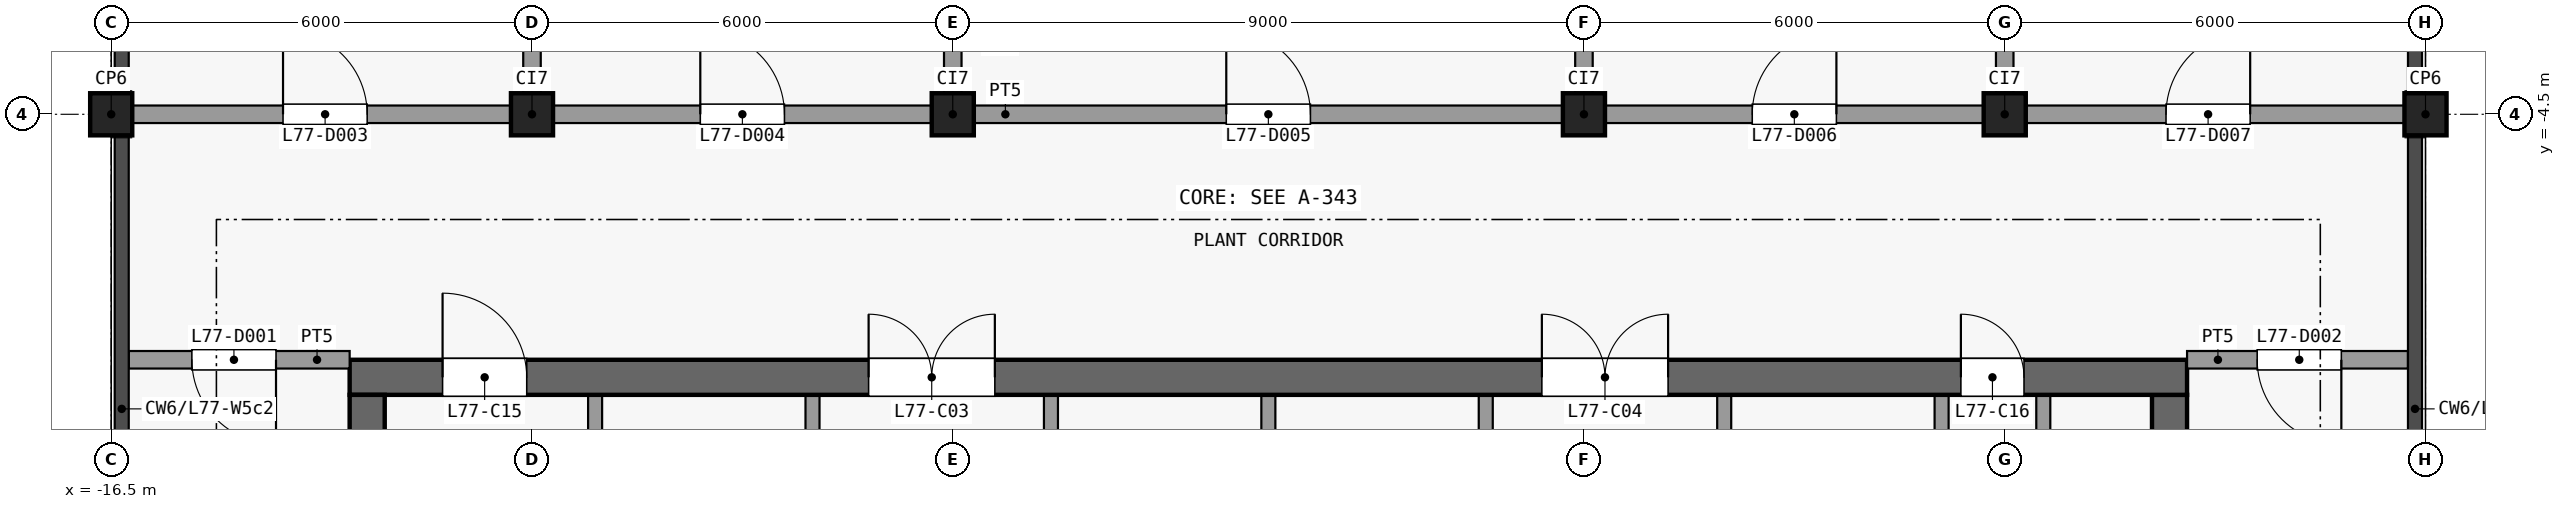
"""IFC4 building model, lengths in metres.
Left out: names, types, materials, properties, quantities, classifications, styles, units other than length and angle.
Written with IfcOpenShell. Run it as: python <this file> out.ifc"""

import sys

from ifc_helpers import new_model, si_unit, direction, frame, frame_2d, origin, origin_2d, place, context, subcontext, project, spatial, rectangle, extrude, element, fill, save


model = new_model("IFC4")
c1 = context("Model", 3, precision=1e-05, world=origin(), true_north=direction((0.0, 1.0)))
c2 = subcontext(c1, "Body", "Model", "MODEL_VIEW")
j1 = project(units=[si_unit("LENGTHUNIT", "METRE"), si_unit("PLANEANGLEUNIT", "RADIAN")], contexts=[c1])
p1 = place(None, origin())
s1 = spatial("IfcSite", under=j1, at=p1, CompositionType="ELEMENT")
p2 = place(p1, origin())
s2 = spatial("IfcBuilding", under=s1, at=p2, CompositionType="ELEMENT")
p3 = place(p2, frame((0.0, 0.0, 303.2)))
s3 = spatial("IfcBuildingStorey", under=s2, at=p3, CompositionType="ELEMENT", Elevation=303.2)
for number, where, z_axis, x_axis in (
    (1, (-16.5, -4.5, 0.0), (0.0, 0.0, 1.0), (1.0, 0.0, 0.0)),
    (2, (-10.5, -4.5, 0.0), (0.0, 0.0, 1.0), (1.0, 0.0, 0.0)),
    (3, (-4.5, -4.5, 0.0), (0.0, 0.0, 1.0), (1.0, 0.0, 0.0)),
    (4, (4.5, -4.5, 0.0), (0.0, 0.0, 1.0), (1.0, 0.0, 0.0)),
    (5, (10.5, -4.5, 0.0), (0.0, 0.0, 1.0), (1.0, 0.0, 0.0)),
    (6, (16.5, -4.5, 0.0), (0.0, 0.0, 1.0), (1.0, 0.0, 0.0)),
):
    element("IfcColumn", number, at=place(p3, frame(where, z_axis=z_axis, x_axis=x_axis)), inside=s3, PredefinedType="COLUMN", context=c2, shape_type="SweptSolid", body=[
        extrude(rectangle(XDim=0.6, YDim=0.6, at=origin_2d()), origin(), (0.0, 0.0, 1.0), 4.5),
    ])
p4 = place(p3, frame((-13.1, -8.25, 0.0), z_axis=(0.0, 0.0, 1.0), x_axis=(1.0, 0.0, 0.0)))
e7 = element("IfcWall", 7, at=p4, inside=s3, PredefinedType="SHEAR", context=c2, shape_type="SweptSolid", body=[
    extrude(rectangle(XDim=26.2, YDim=0.5, at=frame_2d((13.1, 0.0))), origin(), (0.0, 0.0, 1.0), 4.2),
])
p5 = place(p4, frame((7.4, 0.0, 0.0)))
e8 = element("IfcOpeningElement", 8, at=p5, cuts=e7, PredefinedType="OPENING", context=c2, shape_type="SweptSolid", body=[
    extrude(rectangle(XDim=1.8, YDim=2.1, at=frame_2d((0.9, 1.05))), frame((0.0, 0.26, 0.0), z_axis=(0.0, -1.0, 0.0), x_axis=(1.0, 0.0, 0.0)), (0.0, 0.0, 1.0), 0.52),
])
p6 = place(p4, frame((17.0, 0.0, 0.0)))
e9 = element("IfcOpeningElement", 9, at=p6, cuts=e7, PredefinedType="OPENING", context=c2, shape_type="SweptSolid", body=[
    extrude(rectangle(XDim=1.8, YDim=2.1, at=frame_2d((0.9, 1.05))), frame((0.0, 0.26, 0.0), z_axis=(0.0, -1.0, 0.0), x_axis=(1.0, 0.0, 0.0)), (0.0, 0.0, 1.0), 0.52),
])
p7 = place(p4, frame((1.325, 0.0, 0.0)))
e10 = element("IfcOpeningElement", 10, at=p7, cuts=e7, PredefinedType="OPENING", context=c2, shape_type="SweptSolid", body=[
    extrude(rectangle(XDim=1.2, YDim=2.1, at=frame_2d((0.6, 1.05))), frame((0.0, 0.26, 0.0), z_axis=(0.0, -1.0, 0.0), x_axis=(1.0, 0.0, 0.0)), (0.0, 0.0, 1.0), 0.52),
])
p8 = place(p4, frame((22.975, 0.0, 0.0)))
e11 = element("IfcOpeningElement", 11, at=p8, cuts=e7, PredefinedType="OPENING", context=c2, shape_type="SweptSolid", body=[
    extrude(rectangle(XDim=0.9, YDim=2.1, at=frame_2d((0.45, 1.05))), frame((0.0, 0.26, 0.0), z_axis=(0.0, -1.0, 0.0), x_axis=(1.0, 0.0, 0.0)), (0.0, 0.0, 1.0), 0.52),
])
for number, where, z_axis, x_axis in (
    (12, (-12.85, -24.6, 0.0), (0.0, 0.0, 1.0), (0.0, 1.0, 0.0)),
    (13, (12.85, -24.6, 0.0), (0.0, 0.0, 1.0), (0.0, 1.0, 0.0)),
):
    element("IfcWall", number, at=place(p3, frame(where, z_axis=z_axis, x_axis=x_axis)), inside=s3, PredefinedType="SHEAR", context=c2, shape_type="SweptSolid", body=[
        extrude(rectangle(XDim=16.1, YDim=0.5, at=frame_2d((8.05, 0.0))), origin(), (0.0, 0.0, 1.0), 4.2),
    ])
p9 = place(p3, frame((-9.6, -16.9, 0.0), z_axis=(0.0, 0.0, 1.0), x_axis=(0.0, 1.0, 0.0)))
e14 = element("IfcWall", 14, at=p9, inside=s3, PredefinedType="PARTITIONING", context=c2, shape_type="SweptSolid", body=[
    extrude(rectangle(XDim=8.4, YDim=0.2, at=frame_2d((4.2, 0.0))), origin(), (0.0, 0.0, 1.0), 4.2),
])
p10 = place(p3, frame((-6.5, -22.5, 0.0), z_axis=(0.0, 0.0, 1.0), x_axis=(0.0, 1.0, 0.0)))
e15 = element("IfcWall", 15, at=p10, inside=s3, PredefinedType="PARTITIONING", context=c2, shape_type="SweptSolid", body=[
    extrude(rectangle(XDim=14.0, YDim=0.2, at=frame_2d((7.0, 0.0))), origin(), (0.0, 0.0, 1.0), 4.2),
])
p11 = place(p10, frame((2.28, 0.0, 0.0)))
e16 = element("IfcOpeningElement", 16, at=p11, cuts=e15, PredefinedType="OPENING", context=c2, shape_type="SweptSolid", body=[
    extrude(rectangle(XDim=1.2, YDim=2.1, at=frame_2d((0.6, 1.05))), frame((0.0, 0.11, 0.0), z_axis=(0.0, -1.0, 0.0), x_axis=(1.0, 0.0, 0.0)), (0.0, 0.0, 1.0), 0.22),
])
p12 = place(p10, frame((9.23, 0.0, 0.0)))
e17 = element("IfcOpeningElement", 17, at=p12, cuts=e15, PredefinedType="OPENING", context=c2, shape_type="SweptSolid", body=[
    extrude(rectangle(XDim=1.2, YDim=2.1, at=frame_2d((0.6, 1.05))), frame((0.0, 0.11, 0.0), z_axis=(0.0, -1.0, 0.0), x_axis=(1.0, 0.0, 0.0)), (0.0, 0.0, 1.0), 0.22),
])
p13 = place(p3, frame((-3.1, -8.5, 0.0), z_axis=(0.0, 0.0, 1.0), x_axis=(0.0, -1.0, 0.0)))
e18 = element("IfcWall", 18, at=p13, inside=s3, PredefinedType="PARTITIONING", context=c2, shape_type="SweptSolid", body=[
    extrude(rectangle(XDim=10.97, YDim=0.2, at=frame_2d((5.485, 0.0))), origin(), (0.0, 0.0, 1.0), 4.2),
])
p14 = place(p13, frame((7.74, 0.0, 0.0)))
e19 = element("IfcOpeningElement", 19, at=p14, cuts=e18, PredefinedType="OPENING", context=c2, shape_type="SweptSolid", body=[
    extrude(rectangle(XDim=1.2, YDim=2.1, at=frame_2d((0.6, 1.05))), frame((0.0, 0.11, 0.0), z_axis=(0.0, -1.0, 0.0), x_axis=(1.0, 0.0, 0.0)), (0.0, 0.0, 1.0), 0.22),
])
p15 = place(p13, frame((2.18, 0.0, 0.0)))
e20 = element("IfcOpeningElement", 20, at=p15, cuts=e18, PredefinedType="OPENING", context=c2, shape_type="SweptSolid", body=[
    extrude(rectangle(XDim=1.2, YDim=2.1, at=frame_2d((0.6, 1.05))), frame((0.0, 0.11, 0.0), z_axis=(0.0, -1.0, 0.0), x_axis=(1.0, 0.0, 0.0)), (0.0, 0.0, 1.0), 0.22),
])
p16 = place(p3, frame((0.0, -19.35, 0.0), z_axis=(0.0, 0.0, 1.0), x_axis=(0.0, 1.0, 0.0)))
e21 = element("IfcWall", 21, at=p16, inside=s3, PredefinedType="PARTITIONING", context=c2, shape_type="SweptSolid", body=[
    extrude(rectangle(XDim=10.85, YDim=0.2, at=frame_2d((5.425, 0.0))), origin(), (0.0, 0.0, 1.0), 4.2),
])
p17 = place(p3, frame((3.1, -19.6, 0.0), z_axis=(0.0, 0.0, 1.0), x_axis=(0.0, 1.0, 0.0)))
e22 = element("IfcWall", 22, at=p17, inside=s3, PredefinedType="PARTITIONING", context=c2, shape_type="SweptSolid", body=[
    extrude(rectangle(XDim=11.1, YDim=0.2, at=frame_2d((5.55, 0.0))), origin(), (0.0, 0.0, 1.0), 4.2),
])
p18 = place(p17, frame((2.25, 0.0, 0.0)))
e23 = element("IfcOpeningElement", 23, at=p18, cuts=e22, PredefinedType="OPENING", context=c2, shape_type="SweptSolid", body=[
    extrude(rectangle(XDim=1.2, YDim=2.1, at=frame_2d((0.6, 1.05))), frame((0.0, 0.11, 0.0), z_axis=(0.0, -1.0, 0.0), x_axis=(1.0, 0.0, 0.0)), (0.0, 0.0, 1.0), 0.22),
])
p19 = place(p17, frame((7.75, 0.0, 0.0)))
e24 = element("IfcOpeningElement", 24, at=p19, cuts=e22, PredefinedType="OPENING", context=c2, shape_type="SweptSolid", body=[
    extrude(rectangle(XDim=1.2, YDim=2.1, at=frame_2d((0.6, 1.05))), frame((0.0, 0.11, 0.0), z_axis=(0.0, -1.0, 0.0), x_axis=(1.0, 0.0, 0.0)), (0.0, 0.0, 1.0), 0.22),
])
p20 = place(p3, frame((6.5, -8.5, 0.0), z_axis=(0.0, 0.0, 1.0), x_axis=(0.0, -1.0, 0.0)))
e25 = element("IfcWall", 25, at=p20, inside=s3, PredefinedType="PARTITIONING", context=c2, shape_type="SweptSolid", body=[
    extrude(rectangle(XDim=10.85, YDim=0.2, at=frame_2d((5.425, 0.0))), origin(), (0.0, 0.0, 1.0), 4.2),
])
p21 = place(p20, frame((6.275, 0.0, 0.0)))
e26 = element("IfcOpeningElement", 26, at=p21, cuts=e25, PredefinedType="OPENING", context=c2, shape_type="SweptSolid", body=[
    extrude(rectangle(XDim=1.2, YDim=2.1, at=frame_2d((0.6, 1.05))), frame((0.0, 0.11, 0.0), z_axis=(0.0, -1.0, 0.0), x_axis=(1.0, 0.0, 0.0)), (0.0, 0.0, 1.0), 0.22),
])
p22 = place(p20, frame((0.925, 0.0, 0.0)))
e27 = element("IfcOpeningElement", 27, at=p22, cuts=e25, PredefinedType="OPENING", context=c2, shape_type="SweptSolid", body=[
    extrude(rectangle(XDim=0.9, YDim=2.1, at=frame_2d((0.45, 1.05))), frame((0.0, 0.11, 0.0), z_axis=(0.0, -1.0, 0.0), x_axis=(1.0, 0.0, 0.0)), (0.0, 0.0, 1.0), 0.22),
])
p23 = place(p3, frame((9.6, -16.9, 0.0), z_axis=(0.0, 0.0, 1.0), x_axis=(0.0, 1.0, 0.0)))
e28 = element("IfcWall", 28, at=p23, inside=s3, PredefinedType="PARTITIONING", context=c2, shape_type="SweptSolid", body=[
    extrude(rectangle(XDim=8.4, YDim=0.2, at=frame_2d((4.2, 0.0))), origin(), (0.0, 0.0, 1.0), 4.2),
])
p24 = place(p3, frame((11.05, -8.5, 0.0), z_axis=(0.0, 0.0, 1.0), x_axis=(0.0, -1.0, 0.0)))
e29 = element("IfcWall", 29, at=p24, inside=s3, PredefinedType="PARTITIONING", context=c2, shape_type="SweptSolid", body=[
    extrude(rectangle(XDim=6.2, YDim=0.2, at=frame_2d((3.1, 0.0))), origin(), (0.0, 0.0, 1.0), 4.2),
])
p25 = place(p24, frame((2.6, 0.0, 0.0)))
e30 = element("IfcOpeningElement", 30, at=p25, cuts=e29, PredefinedType="OPENING", context=c2, shape_type="SweptSolid", body=[
    extrude(rectangle(XDim=0.9, YDim=2.1, at=frame_2d((0.45, 1.05))), frame((0.0, 0.11, 0.0), z_axis=(0.0, -1.0, 0.0), x_axis=(1.0, 0.0, 0.0)), (0.0, 0.0, 1.0), 0.22),
])
p26 = place(p3, frame((-16.25, -8.0, 0.0), z_axis=(0.0, 0.0, 1.0), x_axis=(1.0, 0.0, 0.0)))
e31 = element("IfcWall", 31, at=p26, inside=s3, PredefinedType="PARTITIONING", context=c2, shape_type="SweptSolid", body=[
    extrude(rectangle(XDim=3.15, YDim=0.25, at=frame_2d((1.575, 0.0))), origin(), (0.0, 0.0, 1.0), 4.2),
])
p27 = place(p26, frame((0.9, 0.0, 0.0)))
e32 = element("IfcOpeningElement", 32, at=p27, cuts=e31, PredefinedType="OPENING", context=c2, shape_type="SweptSolid", body=[
    extrude(rectangle(XDim=1.2, YDim=2.1, at=frame_2d((0.6, 1.05))), frame((0.0, 0.135, 0.0), z_axis=(0.0, -1.0, 0.0), x_axis=(1.0, 0.0, 0.0)), (0.0, 0.0, 1.0), 0.27),
])
p28 = place(p3, frame((13.1, -8.0, 0.0), z_axis=(0.0, 0.0, 1.0), x_axis=(1.0, 0.0, 0.0)))
e33 = element("IfcWall", 33, at=p28, inside=s3, PredefinedType="PARTITIONING", context=c2, shape_type="SweptSolid", body=[
    extrude(rectangle(XDim=3.15, YDim=0.25, at=frame_2d((1.575, 0.0))), origin(), (0.0, 0.0, 1.0), 4.2),
])
p29 = place(p28, frame((1.0, 0.0, 0.0)))
e34 = element("IfcOpeningElement", 34, at=p29, cuts=e33, PredefinedType="OPENING", context=c2, shape_type="SweptSolid", body=[
    extrude(rectangle(XDim=1.2, YDim=2.1, at=frame_2d((0.6, 1.05))), frame((0.0, 0.135, 0.0), z_axis=(0.0, -1.0, 0.0), x_axis=(1.0, 0.0, 0.0)), (0.0, 0.0, 1.0), 0.27),
])
p30 = place(p3, frame((-16.35, -4.5, 0.0), z_axis=(0.0, 0.0, 1.0), x_axis=(1.0, 0.0, 0.0)))
e35 = element("IfcWall", 35, at=p30, inside=s3, PredefinedType="PARTITIONING", context=c2, shape_type="SweptSolid", body=[
    extrude(rectangle(XDim=32.7, YDim=0.25, at=frame_2d((16.35, 0.0))), origin(), (0.0, 0.0, 1.0), 4.2),
])
p31 = place(p30, frame((2.3, 0.0, 0.0)))
e36 = element("IfcOpeningElement", 36, at=p31, cuts=e35, PredefinedType="OPENING", context=c2, shape_type="SweptSolid", body=[
    extrude(rectangle(XDim=1.2, YDim=2.1, at=frame_2d((0.6, 1.05))), frame((0.0, 0.135, 0.0), z_axis=(0.0, -1.0, 0.0), x_axis=(1.0, 0.0, 0.0)), (0.0, 0.0, 1.0), 0.27),
])
p32 = place(p30, frame((8.25, 0.0, 0.0)))
e37 = element("IfcOpeningElement", 37, at=p32, cuts=e35, PredefinedType="OPENING", context=c2, shape_type="SweptSolid", body=[
    extrude(rectangle(XDim=1.2, YDim=2.1, at=frame_2d((0.6, 1.05))), frame((0.0, 0.135, 0.0), z_axis=(0.0, -1.0, 0.0), x_axis=(1.0, 0.0, 0.0)), (0.0, 0.0, 1.0), 0.27),
])
p33 = place(p30, frame((15.75, 0.0, 0.0)))
e38 = element("IfcOpeningElement", 38, at=p33, cuts=e35, PredefinedType="OPENING", context=c2, shape_type="SweptSolid", body=[
    extrude(rectangle(XDim=1.2, YDim=2.1, at=frame_2d((0.6, 1.05))), frame((0.0, 0.135, 0.0), z_axis=(0.0, -1.0, 0.0), x_axis=(1.0, 0.0, 0.0)), (0.0, 0.0, 1.0), 0.27),
])
p34 = place(p30, frame((23.25, 0.0, 0.0)))
e39 = element("IfcOpeningElement", 39, at=p34, cuts=e35, PredefinedType="OPENING", context=c2, shape_type="SweptSolid", body=[
    extrude(rectangle(XDim=1.2, YDim=2.1, at=frame_2d((0.6, 1.05))), frame((0.0, 0.135, 0.0), z_axis=(0.0, -1.0, 0.0), x_axis=(1.0, 0.0, 0.0)), (0.0, 0.0, 1.0), 0.27),
])
p35 = place(p30, frame((29.15, 0.0, 0.0)))
e40 = element("IfcOpeningElement", 40, at=p35, cuts=e35, PredefinedType="OPENING", context=c2, shape_type="SweptSolid", body=[
    extrude(rectangle(XDim=1.2, YDim=2.1, at=frame_2d((0.6, 1.05))), frame((0.0, 0.135, 0.0), z_axis=(0.0, -1.0, 0.0), x_axis=(1.0, 0.0, 0.0)), (0.0, 0.0, 1.0), 0.27),
])
for number, where, z_axis, x_axis in (
    (41, (-10.5, -4.375, 0.0), (0.0, 0.0, 1.0), (0.0, 1.0, 0.0)),
    (42, (-4.5, -4.375, 0.0), (0.0, 0.0, 1.0), (0.0, 1.0, 0.0)),
    (43, (4.5, -4.375, 0.0), (0.0, 0.0, 1.0), (0.0, 1.0, 0.0)),
    (44, (10.5, -4.375, 0.0), (0.0, 0.0, 1.0), (0.0, 1.0, 0.0)),
):
    element("IfcWall", number, at=place(p3, frame(where, z_axis=z_axis, x_axis=x_axis)), inside=s3, PredefinedType="PARTITIONING", context=c2, shape_type="SweptSolid", body=[
        extrude(rectangle(XDim=17.725, YDim=0.25, at=frame_2d((8.863, 0.0))), origin(), (0.0, 0.0, 1.0), 4.2),
    ])
p36 = place(p5, origin())
e45 = element("IfcDoor", 45, at=p36, inside=s3, OperationType="DOUBLE_DOOR_SINGLE_SWING", PredefinedType="DOOR", context=c2, shape_type="SweptSolid", body=[
    extrude(rectangle(XDim=1.8, YDim=2.1, at=frame_2d((0.9, 1.05))), frame((0.0, 0.025, 0.0), z_axis=(0.0, -1.0, 0.0), x_axis=(1.0, 0.0, 0.0)), (0.0, 0.0, 1.0), 0.05),
])
fill(e8, e45)
p37 = place(p6, origin())
e46 = element("IfcDoor", 46, at=p37, inside=s3, OperationType="DOUBLE_DOOR_SINGLE_SWING", PredefinedType="DOOR", context=c2, shape_type="SweptSolid", body=[
    extrude(rectangle(XDim=1.8, YDim=2.1, at=frame_2d((0.9, 1.05))), frame((0.0, 0.025, 0.0), z_axis=(0.0, -1.0, 0.0), x_axis=(1.0, 0.0, 0.0)), (0.0, 0.0, 1.0), 0.05),
])
fill(e9, e46)
p38 = place(p7, origin())
e47 = element("IfcDoor", 47, at=p38, inside=s3, OperationType="SINGLE_SWING_LEFT", PredefinedType="DOOR", context=c2, shape_type="SweptSolid", body=[
    extrude(rectangle(XDim=1.2, YDim=2.1, at=frame_2d((0.6, 1.05))), frame((0.0, 0.025, 0.0), z_axis=(0.0, -1.0, 0.0), x_axis=(1.0, 0.0, 0.0)), (0.0, 0.0, 1.0), 0.05),
])
fill(e10, e47)
p39 = place(p8, origin())
e48 = element("IfcDoor", 48, at=p39, inside=s3, OperationType="SINGLE_SWING_LEFT", PredefinedType="DOOR", context=c2, shape_type="SweptSolid", body=[
    extrude(rectangle(XDim=0.9, YDim=2.1, at=frame_2d((0.45, 1.05))), frame((0.0, 0.025, 0.0), z_axis=(0.0, -1.0, 0.0), x_axis=(1.0, 0.0, 0.0)), (0.0, 0.0, 1.0), 0.05),
])
fill(e11, e48)
p40 = place(p27, origin())
e49 = element("IfcDoor", 49, at=p40, inside=s3, OperationType="SINGLE_SWING_RIGHT", PredefinedType="DOOR", context=c2, shape_type="SweptSolid", body=[
    extrude(rectangle(XDim=1.2, YDim=2.1, at=frame_2d((0.6, 1.05))), frame((0.0, 0.025, 0.0), z_axis=(0.0, -1.0, 0.0), x_axis=(1.0, 0.0, 0.0)), (0.0, 0.0, 1.0), 0.05),
])
fill(e32, e49)
p41 = place(p29, origin())
e50 = element("IfcDoor", 50, at=p41, inside=s3, OperationType="SINGLE_SWING_RIGHT", PredefinedType="DOOR", context=c2, shape_type="SweptSolid", body=[
    extrude(rectangle(XDim=1.2, YDim=2.1, at=frame_2d((0.6, 1.05))), frame((0.0, 0.025, 0.0), z_axis=(0.0, -1.0, 0.0), x_axis=(1.0, 0.0, 0.0)), (0.0, 0.0, 1.0), 0.05),
])
fill(e34, e50)
p42 = place(p31, origin())
e51 = element("IfcDoor", 51, at=p42, inside=s3, OperationType="SINGLE_SWING_RIGHT", PredefinedType="DOOR", context=c2, shape_type="SweptSolid", body=[
    extrude(rectangle(XDim=1.2, YDim=2.1, at=frame_2d((0.6, 1.05))), frame((0.0, 0.025, 0.0), z_axis=(0.0, -1.0, 0.0), x_axis=(1.0, 0.0, 0.0)), (0.0, 0.0, 1.0), 0.05),
])
fill(e36, e51)
p43 = place(p32, origin())
e52 = element("IfcDoor", 52, at=p43, inside=s3, OperationType="SINGLE_SWING_RIGHT", PredefinedType="DOOR", context=c2, shape_type="SweptSolid", body=[
    extrude(rectangle(XDim=1.2, YDim=2.1, at=frame_2d((0.6, 1.05))), frame((0.0, 0.025, 0.0), z_axis=(0.0, -1.0, 0.0), x_axis=(1.0, 0.0, 0.0)), (0.0, 0.0, 1.0), 0.05),
])
fill(e37, e52)
p44 = place(p33, origin())
e53 = element("IfcDoor", 53, at=p44, inside=s3, OperationType="SINGLE_SWING_RIGHT", PredefinedType="DOOR", context=c2, shape_type="SweptSolid", body=[
    extrude(rectangle(XDim=1.2, YDim=2.1, at=frame_2d((0.6, 1.05))), frame((0.0, 0.025, 0.0), z_axis=(0.0, -1.0, 0.0), x_axis=(1.0, 0.0, 0.0)), (0.0, 0.0, 1.0), 0.05),
])
fill(e38, e53)
p45 = place(p34, origin())
e54 = element("IfcDoor", 54, at=p45, inside=s3, OperationType="SINGLE_SWING_LEFT", PredefinedType="DOOR", context=c2, shape_type="SweptSolid", body=[
    extrude(rectangle(XDim=1.2, YDim=2.1, at=frame_2d((0.6, 1.05))), frame((0.0, 0.025, 0.0), z_axis=(0.0, -1.0, 0.0), x_axis=(1.0, 0.0, 0.0)), (0.0, 0.0, 1.0), 0.05),
])
fill(e39, e54)
p46 = place(p35, origin())
e55 = element("IfcDoor", 55, at=p46, inside=s3, OperationType="SINGLE_SWING_LEFT", PredefinedType="DOOR", context=c2, shape_type="SweptSolid", body=[
    extrude(rectangle(XDim=1.2, YDim=2.1, at=frame_2d((0.6, 1.05))), frame((0.0, 0.025, 0.0), z_axis=(0.0, -1.0, 0.0), x_axis=(1.0, 0.0, 0.0)), (0.0, 0.0, 1.0), 0.05),
])
fill(e40, e55)
save(model, sys.argv[1])
